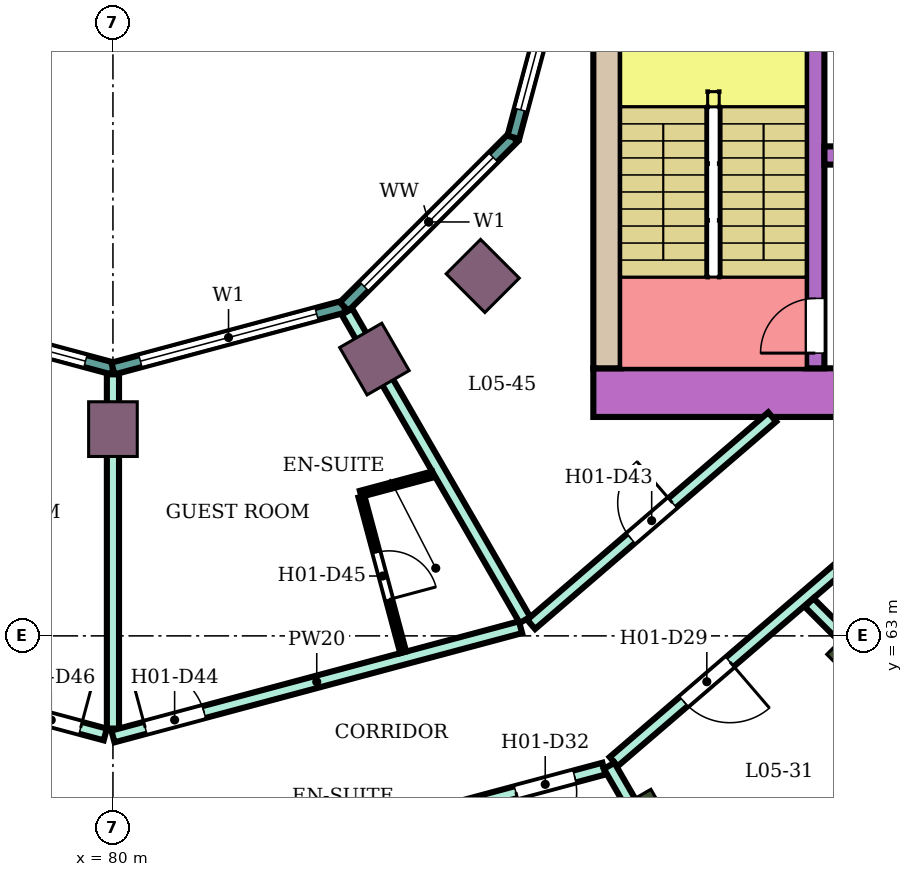
"""IFC4 building model, lengths in metres.
Left out: names, types, materials, properties, quantities, classifications, styles, units other than length and angle.
Written with IfcOpenShell. Run it as: python <this file> out.ifc"""

import sys

from ifc_helpers import new_model, si_unit, direction, frame, frame_2d, origin, origin_2d, place, context, subcontext, project, spatial, rectangle, extrude, element, fill, save


model = new_model("IFC4")
c1 = context("Model", 3, precision=1e-05, world=origin(), true_north=direction((0.0, 1.0)))
c2 = subcontext(c1, "Body", "Model", "MODEL_VIEW")
j1 = project(units=[si_unit("LENGTHUNIT", "METRE"), si_unit("PLANEANGLEUNIT", "RADIAN")], contexts=[c1])
p1 = place(None, origin())
s1 = spatial("IfcSite", under=j1, at=p1, CompositionType="ELEMENT")
p2 = place(p1, origin())
s2 = spatial("IfcBuilding", under=s1, at=p2, CompositionType="ELEMENT")
p3 = place(p2, frame((0.0, 0.0, 28.8)))
s3 = spatial("IfcBuildingStorey", under=s2, at=p3, CompositionType="ELEMENT", Elevation=28.8)
for number, where, z_axis, x_axis in (
    (1, (88.8, 59.758, 0.0), (0.0, 0.0, 1.0), (0.5, -0.866, 0.0)),
    (2, (92.445, 62.555, 0.0), (0.0, 0.0, 1.0), (0.707, -0.707, 0.0)),
):
    element("IfcColumn", number, at=place(p3, frame(where, z_axis=z_axis, x_axis=x_axis)), inside=s3, PredefinedType="COLUMN", context=c2, shape_type="SweptSolid", body=[
        extrude(rectangle(XDim=1.2, YDim=0.8, at=origin_2d()), origin(), (0.0, 0.0, 1.0), 3.8),
    ])
for number, where, z_axis, x_axis in (
    (3, (80.0, 66.4, 0.0), (0.0, 0.0, 1.0), (0.0, -1.0, 0.0)),
    (4, (84.3, 67.552, 0.0), (0.0, 0.0, 1.0), (0.5, -0.866, 0.0)),
    (5, (86.081, 68.919, 0.0), (0.0, 0.0, 1.0), (0.707, -0.707, 0.0)),
):
    element("IfcColumn", number, at=place(p3, frame(where, z_axis=z_axis, x_axis=x_axis)), inside=s3, PredefinedType="COLUMN", context=c2, shape_type="SweptSolid", body=[
        extrude(rectangle(XDim=0.9, YDim=0.8, at=origin_2d()), origin(), (0.0, 0.0, 1.0), 3.8),
    ])
p4 = place(p3, frame((87.9, 67.0, 0.0), z_axis=(0.0, 0.0, 1.0), x_axis=(1.0, 0.0, 0.0)))
e6 = element("IfcWall", 6, at=p4, inside=s3, PredefinedType="SHEAR", context=c2, shape_type="SweptSolid", body=[
    extrude(rectangle(XDim=14.7, YDim=0.8, at=frame_2d((7.35, 0.0))), origin(), (0.0, 0.0, 1.0), 3.48),
])
p5 = place(p4, frame((4.2, 0.0, 0.0)))
e7 = element("IfcOpeningElement", 7, at=p5, cuts=e6, PredefinedType="OPENING", context=c2, shape_type="SweptSolid", body=[
    extrude(rectangle(XDim=2.4, YDim=2.4, at=frame_2d((1.2, 1.2))), frame((0.0, 0.41, 0.0), z_axis=(0.0, -1.0, 0.0), x_axis=(1.0, 0.0, 0.0)), (0.0, 0.0, 1.0), 0.82),
])
p6 = place(p3, frame((88.125, 67.4, 0.0), z_axis=(0.0, 0.0, 1.0), x_axis=(0.0, 1.0, 0.0)))
e8 = element("IfcWall", 8, at=p6, inside=s3, PredefinedType="SHEAR", context=c2, shape_type="SweptSolid", body=[
    extrude(rectangle(XDim=7.6, YDim=0.45, at=frame_2d((3.8, 0.0))), origin(), (0.0, 0.0, 1.0), 3.48),
])
p7 = place(p3, frame((91.55, 67.4, 0.0), z_axis=(0.0, 0.0, 1.0), x_axis=(0.0, 1.0, 0.0)))
e9 = element("IfcWall", 9, at=p7, inside=s3, PredefinedType="SHEAR", context=c2, shape_type="SweptSolid", body=[
    extrude(rectangle(XDim=7.6, YDim=0.3, at=frame_2d((3.8, 0.0))), origin(), (0.0, 0.0, 1.0), 3.48),
])
p8 = place(p7, frame((0.25, 0.0, 0.0)))
e10 = element("IfcOpeningElement", 10, at=p8, cuts=e9, PredefinedType="OPENING", context=c2, shape_type="SweptSolid", body=[
    extrude(rectangle(XDim=0.9, YDim=2.1, at=frame_2d((0.45, 1.05))), frame((0.0, 0.16, 0.0), z_axis=(0.0, -1.0, 0.0), x_axis=(1.0, 0.0, 0.0)), (0.0, 0.0, 1.0), 0.32),
])
p9 = place(p3, frame((91.7, 70.9, 0.0), z_axis=(0.0, 0.0, 1.0), x_axis=(1.0, 0.0, 0.0)))
e11 = element("IfcWall", 11, at=p9, inside=s3, PredefinedType="SHEAR", context=c2, shape_type="SweptSolid", body=[
    extrude(rectangle(XDim=10.9, YDim=0.3, at=frame_2d((5.45, 0.0))), origin(), (0.0, 0.0, 1.0), 3.48),
])
p10 = place(p9, frame((0.4, 0.0, 0.0)))
e12 = element("IfcOpeningElement", 12, at=p10, cuts=e11, PredefinedType="OPENING", context=c2, shape_type="SweptSolid", body=[
    extrude(rectangle(XDim=1.4, YDim=2.1, at=frame_2d((0.7, 1.05))), frame((0.0, 0.16, 0.0), z_axis=(0.0, -1.0, 0.0), x_axis=(1.0, 0.0, 0.0)), (0.0, 0.0, 1.0), 0.32),
])
p11 = place(p9, frame((5.4, 0.0, 0.0)))
e13 = element("IfcOpeningElement", 13, at=p11, cuts=e11, PredefinedType="OPENING", context=c2, shape_type="SweptSolid", body=[
    extrude(rectangle(XDim=1.4, YDim=2.1, at=frame_2d((0.7, 1.05))), frame((0.0, 0.16, 0.0), z_axis=(0.0, -1.0, 0.0), x_axis=(1.0, 0.0, 0.0)), (0.0, 0.0, 1.0), 0.32),
])
p12 = place(p9, frame((8.1, 0.0, 0.0)))
e14 = element("IfcOpeningElement", 14, at=p12, cuts=e11, PredefinedType="OPENING", context=c2, shape_type="SweptSolid", body=[
    extrude(rectangle(XDim=1.0, YDim=2.1, at=frame_2d((0.5, 1.05))), frame((0.0, 0.16, 0.0), z_axis=(0.0, -1.0, 0.0), x_axis=(1.0, 0.0, 0.0)), (0.0, 0.0, 1.0), 0.32),
])
p13 = place(p3, frame((76.198, 68.415, 0.0), z_axis=(0.0, 0.0, 1.0), x_axis=(0.965933654434, -0.258789828301, 0.0)))
e15 = element("IfcWall", 15, at=p13, inside=s3, PredefinedType="NOTDEFINED", context=c2, shape_type="SweptSolid", body=[
    extrude(rectangle(XDim=3.936, YDim=0.2, at=frame_2d((1.968, 0.0))), origin(), (0.0, 0.0, 1.0), 3.8),
])
p14 = place(p13, frame((0.468, 0.0, 0.9)))
e16 = element("IfcOpeningElement", 16, at=p14, cuts=e15, PredefinedType="OPENING", context=c2, shape_type="SweptSolid", body=[
    extrude(rectangle(XDim=3.0, YDim=2.3, at=frame_2d((1.5, 1.15))), frame((0.0, 0.11, 0.0), z_axis=(0.0, -1.0, 0.0), x_axis=(1.0, 0.0, 0.0)), (0.0, 0.0, 1.0), 0.22),
])
p15 = place(p3, frame((80.0, 67.396, 0.0), z_axis=(0.0, 0.0, 1.0), x_axis=(0.965933654434, 0.258789828301, 0.0)))
e17 = element("IfcWall", 17, at=p15, inside=s3, PredefinedType="NOTDEFINED", context=c2, shape_type="SweptSolid", body=[
    extrude(rectangle(XDim=3.936, YDim=0.2, at=frame_2d((1.968, 0.0))), origin(), (0.0, 0.0, 1.0), 3.8),
])
p16 = place(p15, frame((0.468, 0.0, 0.9)))
e18 = element("IfcOpeningElement", 18, at=p16, cuts=e17, PredefinedType="OPENING", context=c2, shape_type="SweptSolid", body=[
    extrude(rectangle(XDim=3.0, YDim=2.3, at=frame_2d((1.5, 1.15))), frame((0.0, 0.11, 0.0), z_axis=(0.0, -1.0, 0.0), x_axis=(1.0, 0.0, 0.0)), (0.0, 0.0, 1.0), 0.22),
])
p17 = place(p3, frame((83.802, 68.415, 0.0), z_axis=(0.0, 0.0, 1.0), x_axis=(0.707106781187, 0.707106781187, 0.0)))
e19 = element("IfcWall", 19, at=p17, inside=s3, PredefinedType="NOTDEFINED", context=c2, shape_type="SweptSolid", body=[
    extrude(rectangle(XDim=3.936, YDim=0.2, at=frame_2d((1.968, 0.0))), origin(), (0.0, 0.0, 1.0), 3.8),
])
p18 = place(p17, frame((0.468, 0.0, 0.9)))
e20 = element("IfcOpeningElement", 20, at=p18, cuts=e19, PredefinedType="OPENING", context=c2, shape_type="SweptSolid", body=[
    extrude(rectangle(XDim=3.0, YDim=2.3, at=frame_2d((1.5, 1.15))), frame((0.0, 0.11, 0.0), z_axis=(0.0, -1.0, 0.0), x_axis=(1.0, 0.0, 0.0)), (0.0, 0.0, 1.0), 0.22),
])
p19 = place(p3, frame((86.585, 71.198, 0.0), z_axis=(0.0, 0.0, 1.0), x_axis=(0.258789828301, 0.965933654434, 0.0)))
e21 = element("IfcWall", 21, at=p19, inside=s3, PredefinedType="NOTDEFINED", context=c2, shape_type="SweptSolid", body=[
    extrude(rectangle(XDim=3.936, YDim=0.2, at=frame_2d((1.968, 0.0))), origin(), (0.0, 0.0, 1.0), 3.8),
])
p20 = place(p19, frame((0.468, 0.0, 0.9)))
e22 = element("IfcOpeningElement", 22, at=p20, cuts=e21, PredefinedType="OPENING", context=c2, shape_type="SweptSolid", body=[
    extrude(rectangle(XDim=3.0, YDim=2.3, at=frame_2d((1.5, 1.15))), frame((0.0, 0.11, 0.0), z_axis=(0.0, -1.0, 0.0), x_axis=(1.0, 0.0, 0.0)), (0.0, 0.0, 1.0), 0.22),
])
p21 = place(p3, frame((71.877, 60.831, 0.0), z_axis=(0.0, 0.0, 1.0), x_axis=(0.965852509869, -0.259092510851, 0.0)))
e23 = element("IfcWall", 23, at=p21, inside=s3, PredefinedType="PARTITIONING", context=c2, shape_type="SweptSolid", body=[
    extrude(rectangle(XDim=8.32, YDim=0.2, at=frame_2d((4.16, 0.0))), origin(), (0.0, 0.0, 1.0), 3.35),
])
p22 = place(p21, frame((6.86, 0.0, 0.0)))
e24 = element("IfcOpeningElement", 24, at=p22, cuts=e23, PredefinedType="OPENING", context=c2, shape_type="SweptSolid", body=[
    extrude(rectangle(XDim=1.0, YDim=2.1, at=frame_2d((0.5, 1.05))), frame((0.0, 0.11, 0.0), z_axis=(0.0, -1.0, 0.0), x_axis=(1.0, 0.0, 0.0)), (0.0, 0.0, 1.0), 0.22),
])
p23 = place(p3, frame((73.297, 63.143, 0.0), z_axis=(0.0, 0.0, 1.0), x_axis=(0.965859030528, -0.25906820173, 0.0)))
e25 = element("IfcWall", 25, at=p23, inside=s3, PredefinedType="PARTITIONING", context=c2, shape_type="SweptSolid", body=[
    extrude(rectangle(XDim=6.81, YDim=0.2, at=frame_2d((3.405, 0.0))), origin(), (0.0, 0.0, 1.0), 3.35),
])
p24 = place(p23, frame((5.39, 0.0, 0.0)))
e26 = element("IfcOpeningElement", 26, at=p24, cuts=e25, PredefinedType="OPENING", context=c2, shape_type="SweptSolid", body=[
    extrude(rectangle(XDim=1.0, YDim=2.1, at=frame_2d((0.5, 1.05))), frame((0.0, 0.11, 0.0), z_axis=(0.0, -1.0, 0.0), x_axis=(1.0, 0.0, 0.0)), (0.0, 0.0, 1.0), 0.22),
])
p25 = place(p3, frame((80.0, 58.655, 0.0), z_axis=(0.0, 0.0, 1.0), x_axis=(0.965974635626, 0.258636817424, 0.0)))
e27 = element("IfcWall", 27, at=p25, inside=s3, PredefinedType="PARTITIONING", context=c2, shape_type="SweptSolid", body=[
    extrude(rectangle(XDim=8.36, YDim=0.2, at=frame_2d((4.18, 0.0))), origin(), (0.0, 0.0, 1.0), 3.35),
])
p26 = place(p25, frame((6.86, 0.0, 0.0)))
e28 = element("IfcOpeningElement", 28, at=p26, cuts=e27, PredefinedType="OPENING", context=c2, shape_type="SweptSolid", body=[
    extrude(rectangle(XDim=1.0, YDim=2.1, at=frame_2d((0.5, 1.05))), frame((0.0, 0.11, 0.0), z_axis=(0.0, -1.0, 0.0), x_axis=(1.0, 0.0, 0.0)), (0.0, 0.0, 1.0), 0.22),
])
p27 = place(p25, frame((0.55, 0.0, 0.0)))
e29 = element("IfcOpeningElement", 29, at=p27, cuts=e27, PredefinedType="OPENING", context=c2, shape_type="SweptSolid", body=[
    extrude(rectangle(XDim=1.0, YDim=2.1, at=frame_2d((0.5, 1.05))), frame((0.0, 0.11, 0.0), z_axis=(0.0, -1.0, 0.0), x_axis=(1.0, 0.0, 0.0)), (0.0, 0.0, 1.0), 0.22),
])
p28 = place(p3, frame((80.0, 61.476, 0.0), z_axis=(0.0, 0.0, 1.0), x_axis=(0.0, 1.0, 0.0)))
e30 = element("IfcWall", 30, at=p28, inside=s3, PredefinedType="PARTITIONING", context=c2, shape_type="SweptSolid", body=[
    extrude(rectangle(XDim=5.825, YDim=0.2, at=frame_2d((2.913, 0.0))), origin(), (0.0, 0.0, 1.0), 3.35),
])
p29 = place(p3, frame((80.0, 61.346, 0.0), z_axis=(0.0, 0.0, 1.0), x_axis=(0.965924181808, 0.258825182312, 0.0)))
e31 = element("IfcWall", 31, at=p29, inside=s3, PredefinedType="PARTITIONING", context=c2, shape_type="SweptSolid", body=[
    extrude(rectangle(XDim=6.94, YDim=0.2, at=frame_2d((3.47, 0.0))), origin(), (0.0, 0.0, 1.0), 3.35),
])
p30 = place(p29, frame((0.55, 0.0, 0.0)))
e32 = element("IfcOpeningElement", 32, at=p30, cuts=e31, PredefinedType="OPENING", context=c2, shape_type="SweptSolid", body=[
    extrude(rectangle(XDim=1.0, YDim=2.1, at=frame_2d((0.5, 1.05))), frame((0.0, 0.11, 0.0), z_axis=(0.0, -1.0, 0.0), x_axis=(1.0, 0.0, 0.0)), (0.0, 0.0, 1.0), 0.22),
])
p31 = place(p3, frame((83.848, 68.333, 0.0), z_axis=(0.0, 0.0, 1.0), x_axis=(0.499951054106, -0.866053660865, 0.0)))
e33 = element("IfcWall", 33, at=p31, inside=s3, PredefinedType="PARTITIONING", context=c2, shape_type="SweptSolid", body=[
    extrude(rectangle(XDim=5.855, YDim=0.2, at=frame_2d((2.927, 0.0))), origin(), (0.0, 0.0, 1.0), 3.35),
])
p32 = place(p3, frame((86.877, 63.189, 0.0), z_axis=(0.0, 0.0, 1.0), x_axis=(0.758075808328, 0.652166442581, 0.0)))
e34 = element("IfcWall", 34, at=p32, inside=s3, PredefinedType="PARTITIONING", context=c2, shape_type="SweptSolid", body=[
    extrude(rectangle(XDim=5.23, YDim=0.2, at=frame_2d((2.615, 0.0))), origin(), (0.0, 0.0, 1.0), 3.35),
])
p33 = place(p32, frame((2.165, 0.0, 0.0)))
e35 = element("IfcOpeningElement", 35, at=p33, cuts=e34, PredefinedType="OPENING", context=c2, shape_type="SweptSolid", body=[
    extrude(rectangle(XDim=0.9, YDim=2.1, at=frame_2d((0.45, 1.05))), frame((0.0, 0.11, 0.0), z_axis=(0.0, -1.0, 0.0), x_axis=(1.0, 0.0, 0.0)), (0.0, 0.0, 1.0), 0.22),
])
p34 = place(p3, frame((88.235, 60.931, 0.0), z_axis=(0.0, 0.0, 1.0), x_axis=(0.758799498714, 0.651324282329, 0.0)))
e36 = element("IfcWall", 36, at=p34, inside=s3, PredefinedType="PARTITIONING", context=c2, shape_type="SweptSolid", body=[
    extrude(rectangle(XDim=6.186, YDim=0.2, at=frame_2d((3.093, 0.0))), origin(), (0.0, 0.0, 1.0), 3.35),
])
p35 = place(p34, frame((1.519, 0.0, 0.0)))
e37 = element("IfcOpeningElement", 37, at=p35, cuts=e36, PredefinedType="OPENING", context=c2, shape_type="SweptSolid", body=[
    extrude(rectangle(XDim=1.0, YDim=2.1, at=frame_2d((0.5, 1.05))), frame((0.0, 0.11, 0.0), z_axis=(0.0, -1.0, 0.0), x_axis=(1.0, 0.0, 0.0)), (0.0, 0.0, 1.0), 0.22),
])
p36 = place(p3, frame((88.16, 60.863, 0.0), z_axis=(0.0, 0.0, 1.0), x_axis=(0.499946996988, -0.866056002925, 0.0)))
e38 = element("IfcWall", 38, at=p36, inside=s3, PredefinedType="PARTITIONING", context=c2, shape_type="SweptSolid", body=[
    extrude(rectangle(XDim=9.475, YDim=0.2, at=frame_2d((4.737, 0.0))), origin(), (0.0, 0.0, 1.0), 3.35),
])
p37 = place(p3, frame((91.449, 63.548, 0.0), z_axis=(0.0, 0.0, 1.0), x_axis=(0.706984804638, -0.707228736698, 0.0)))
e39 = element("IfcWall", 39, at=p37, inside=s3, PredefinedType="PARTITIONING", context=c2, shape_type="SweptSolid", body=[
    extrude(rectangle(XDim=7.006, YDim=0.2, at=frame_2d((3.503, 0.0))), origin(), (0.0, 0.0, 1.0), 3.35),
])
p38 = place(p3, frame((84.087, 65.289, 0.0), z_axis=(0.0, 0.0, 1.0), x_axis=(0.258929459649, -0.965896234037, 0.0)))
e40 = element("IfcWall", 40, at=p38, inside=s3, PredefinedType="PARTITIONING", context=c2, shape_type="SweptSolid", body=[
    extrude(rectangle(XDim=2.65, YDim=0.1, at=frame_2d((1.325, 0.0))), origin(), (0.0, 0.0, 1.0), 3.35),
])
p39 = place(p38, frame((0.95, 0.0, 0.0)))
e41 = element("IfcOpeningElement", 41, at=p39, cuts=e40, PredefinedType="OPENING", context=c2, shape_type="SweptSolid", body=[
    extrude(rectangle(XDim=0.8, YDim=2.1, at=frame_2d((0.4, 1.05))), frame((0.0, 0.06, 0.0), z_axis=(0.0, -1.0, 0.0), x_axis=(1.0, 0.0, 0.0)), (0.0, 0.0, 1.0), 0.12),
])
p40 = place(p3, frame((84.074, 65.337, 0.0), z_axis=(0.0, 0.0, 1.0), x_axis=(0.965914351064, 0.258861867428, 0.0)))
e42 = element("IfcWall", 42, at=p40, inside=s3, PredefinedType="PARTITIONING", context=c2, shape_type="SweptSolid", body=[
    extrude(rectangle(XDim=1.229, YDim=0.1, at=frame_2d((0.615, 0.0))), origin(), (0.0, 0.0, 1.0), 3.35),
])
p41 = place(p3, frame((90.178, 57.587, 0.0), z_axis=(0.0, 0.0, 1.0), x_axis=(0.758140003227, 0.652091815243, 0.0)))
e43 = element("IfcWall", 43, at=p41, inside=s3, PredefinedType="PARTITIONING", context=c2, shape_type="SweptSolid", body=[
    extrude(rectangle(XDim=5.021, YDim=0.1, at=frame_2d((2.51, 0.0))), origin(), (0.0, 0.0, 1.0), 3.35),
])
p42 = place(p41, frame((1.071, 0.0, 0.0)))
e44 = element("IfcOpeningElement", 44, at=p42, cuts=e43, PredefinedType="OPENING", context=c2, shape_type="SweptSolid", body=[
    extrude(rectangle(XDim=0.9, YDim=2.1, at=frame_2d((0.45, 1.05))), frame((0.0, 0.06, 0.0), z_axis=(0.0, -1.0, 0.0), x_axis=(1.0, 0.0, 0.0)), (0.0, 0.0, 1.0), 0.12),
])
p43 = place(p14, origin())
e45 = element("IfcWindow", 45, at=p43, inside=s3, PartitioningType="SINGLE_PANEL", PredefinedType="WINDOW", context=c2, shape_type="SweptSolid", body=[
    extrude(rectangle(XDim=3.0, YDim=2.3, at=frame_2d((1.5, 1.15))), frame((0.0, 0.03, 0.0), z_axis=(0.0, -1.0, 0.0), x_axis=(1.0, 0.0, 0.0)), (0.0, 0.0, 1.0), 0.06),
])
fill(e16, e45)
p44 = place(p16, origin())
e46 = element("IfcWindow", 46, at=p44, inside=s3, PartitioningType="SINGLE_PANEL", PredefinedType="WINDOW", context=c2, shape_type="SweptSolid", body=[
    extrude(rectangle(XDim=3.0, YDim=2.3, at=frame_2d((1.5, 1.15))), frame((0.0, 0.03, 0.0), z_axis=(0.0, -1.0, 0.0), x_axis=(1.0, 0.0, 0.0)), (0.0, 0.0, 1.0), 0.06),
])
fill(e18, e46)
p45 = place(p18, origin())
e47 = element("IfcWindow", 47, at=p45, inside=s3, PartitioningType="SINGLE_PANEL", PredefinedType="WINDOW", context=c2, shape_type="SweptSolid", body=[
    extrude(rectangle(XDim=3.0, YDim=2.3, at=frame_2d((1.5, 1.15))), frame((0.0, 0.03, 0.0), z_axis=(0.0, -1.0, 0.0), x_axis=(1.0, 0.0, 0.0)), (0.0, 0.0, 1.0), 0.06),
])
fill(e20, e47)
p46 = place(p20, origin())
e48 = element("IfcWindow", 48, at=p46, inside=s3, PartitioningType="SINGLE_PANEL", PredefinedType="WINDOW", context=c2, shape_type="SweptSolid", body=[
    extrude(rectangle(XDim=3.0, YDim=2.3, at=frame_2d((1.5, 1.15))), frame((0.0, 0.03, 0.0), z_axis=(0.0, -1.0, 0.0), x_axis=(1.0, 0.0, 0.0)), (0.0, 0.0, 1.0), 0.06),
])
fill(e22, e48)
p47 = place(p35, frame((1.0, 0.0, 0.0), z_axis=(0.0, 0.0, 1.0), x_axis=(-1.0, 0.0, 0.0)))
e49 = element("IfcDoor", 49, at=p47, inside=s3, OperationType="SINGLE_SWING_LEFT", PredefinedType="DOOR", context=c2, shape_type="SweptSolid", body=[
    extrude(rectangle(XDim=1.0, YDim=2.1, at=frame_2d((0.5, 1.05))), frame((0.0, 0.025, 0.0), z_axis=(0.0, -1.0, 0.0), x_axis=(1.0, 0.0, 0.0)), (0.0, 0.0, 1.0), 0.05),
])
fill(e37, e49)
p48 = place(p26, frame((1.0, 0.0, 0.0), z_axis=(0.0, 0.0, 1.0), x_axis=(-1.0, 0.0, 0.0)))
e50 = element("IfcDoor", 50, at=p48, inside=s3, OperationType="SINGLE_SWING_RIGHT", PredefinedType="DOOR", context=c2, shape_type="SweptSolid", body=[
    extrude(rectangle(XDim=1.0, YDim=2.1, at=frame_2d((0.5, 1.05))), frame((0.0, 0.025, 0.0), z_axis=(0.0, -1.0, 0.0), x_axis=(1.0, 0.0, 0.0)), (0.0, 0.0, 1.0), 0.05),
])
fill(e28, e50)
p49 = place(p33, origin())
e51 = element("IfcDoor", 51, at=p49, inside=s3, OperationType="SINGLE_SWING_RIGHT", PredefinedType="DOOR", context=c2, shape_type="SweptSolid", body=[
    extrude(rectangle(XDim=0.9, YDim=2.1, at=frame_2d((0.45, 1.05))), frame((0.0, 0.025, 0.0), z_axis=(0.0, -1.0, 0.0), x_axis=(1.0, 0.0, 0.0)), (0.0, 0.0, 1.0), 0.05),
])
fill(e35, e51)
p50 = place(p30, origin())
e52 = element("IfcDoor", 52, at=p50, inside=s3, OperationType="SINGLE_SWING_LEFT", PredefinedType="DOOR", context=c2, shape_type="SweptSolid", body=[
    extrude(rectangle(XDim=1.0, YDim=2.1, at=frame_2d((0.5, 1.05))), frame((0.0, 0.025, 0.0), z_axis=(0.0, -1.0, 0.0), x_axis=(1.0, 0.0, 0.0)), (0.0, 0.0, 1.0), 0.05),
])
fill(e32, e52)
p51 = place(p39, origin())
e53 = element("IfcDoor", 53, at=p51, inside=s3, OperationType="SINGLE_SWING_RIGHT", PredefinedType="DOOR", context=c2, shape_type="SweptSolid", body=[
    extrude(rectangle(XDim=0.8, YDim=2.1, at=frame_2d((0.4, 1.05))), frame((0.0, 0.025, 0.0), z_axis=(0.0, -1.0, 0.0), x_axis=(1.0, 0.0, 0.0)), (0.0, 0.0, 1.0), 0.05),
])
fill(e41, e53)
p52 = place(p24, origin())
e54 = element("IfcDoor", 54, at=p52, inside=s3, OperationType="SINGLE_SWING_RIGHT", PredefinedType="DOOR", context=c2, shape_type="SweptSolid", body=[
    extrude(rectangle(XDim=1.0, YDim=2.1, at=frame_2d((0.5, 1.05))), frame((0.0, 0.025, 0.0), z_axis=(0.0, -1.0, 0.0), x_axis=(1.0, 0.0, 0.0)), (0.0, 0.0, 1.0), 0.05),
])
fill(e26, e54)
p53 = place(p8, origin())
e55 = element("IfcDoor", 55, at=p53, inside=s3, OperationType="SINGLE_SWING_LEFT", PredefinedType="DOOR", context=c2, shape_type="SweptSolid", body=[
    extrude(rectangle(XDim=0.9, YDim=2.1, at=frame_2d((0.45, 1.05))), frame((0.0, 0.025, 0.0), z_axis=(0.0, -1.0, 0.0), x_axis=(1.0, 0.0, 0.0)), (0.0, 0.0, 1.0), 0.05),
])
fill(e10, e55)
save(model, sys.argv[1])
